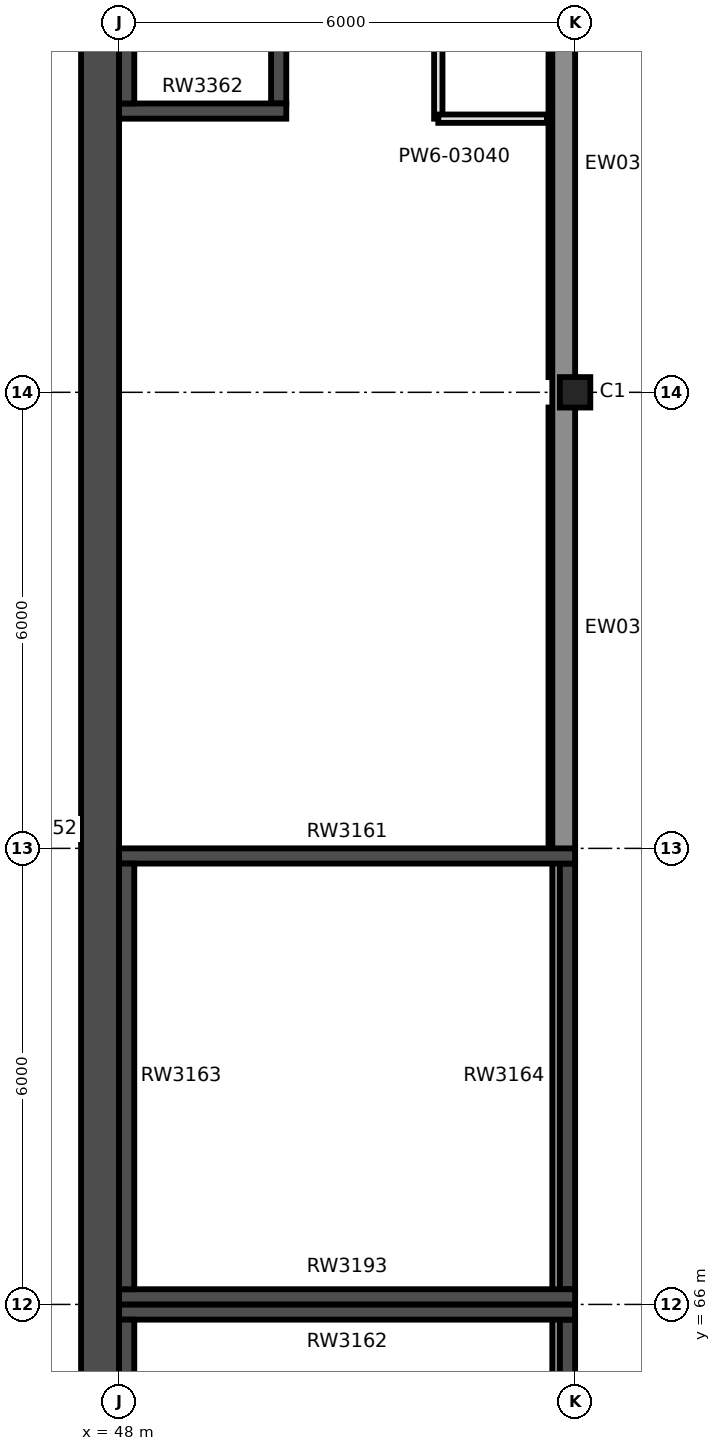
"""IFC4 building model, lengths in metres.
Left out: names, types, materials, properties, quantities, classifications, styles, units other than length and angle.
Written with IfcOpenShell. Run it as: python <this file> out.ifc"""

import sys

from ifc_helpers import new_model, si_unit, direction, frame, frame_2d, origin, origin_2d, place, context, subcontext, project, spatial, rectangle, extrude, element, fill, save


model = new_model("IFC4")
c1 = context("Model", 3, precision=1e-05, world=origin(), true_north=direction((0.0, 1.0)))
c2 = subcontext(c1, "Body", "Model", "MODEL_VIEW")
j1 = project(units=[si_unit("LENGTHUNIT", "METRE"), si_unit("PLANEANGLEUNIT", "RADIAN")], contexts=[c1])
p1 = place(None, origin())
s1 = spatial("IfcSite", under=j1, at=p1, CompositionType="ELEMENT")
p2 = place(p1, origin())
s2 = spatial("IfcBuilding", under=s1, at=p2, CompositionType="ELEMENT")
p3 = place(p2, frame((0.0, 0.0, 16.5)))
s3 = spatial("IfcBuildingStorey", under=s2, at=p3, CompositionType="ELEMENT", Elevation=16.5)
p4 = place(p3, frame((54.0, 78.0, 0.0), z_axis=(0.0, 0.0, 1.0), x_axis=(1.0, 0.0, 0.0)))
e1 = element("IfcColumn", 1, at=p4, inside=s3, PredefinedType="COLUMN", context=c2, shape_type="SweptSolid", body=[
    extrude(rectangle(XDim=0.4, YDim=0.4, at=origin_2d()), origin(), (0.0, 0.0, 1.0), 4.5),
])
p5 = place(p3, frame((48.0, 71.9, 0.0), z_axis=(0.0, 0.0, 1.0), x_axis=(1.0, 0.0, 0.0)))
e2 = element("IfcWall", 2, at=p5, inside=s3, PredefinedType="SHEAR", context=c2, shape_type="SweptSolid", body=[
    extrude(rectangle(XDim=6.0, YDim=0.2, at=frame_2d((3.0, 0.0))), origin(), (0.0, 0.0, 1.0), 4.422),
])
p6 = place(p5, frame((4.6, 0.0, 0.0)))
e3 = element("IfcOpeningElement", 3, at=p6, cuts=e2, PredefinedType="OPENING", context=c2, shape_type="SweptSolid", body=[
    extrude(rectangle(XDim=1.1, YDim=2.2, at=frame_2d((0.55, 1.1))), frame((0.0, 0.11, 0.0), z_axis=(0.0, -1.0, 0.0), x_axis=(1.0, 0.0, 0.0)), (0.0, 0.0, 1.0), 0.22),
])
p7 = place(p3, frame((48.0, 66.1, 0.0), z_axis=(0.0, 0.0, 1.0), x_axis=(1.0, 0.0, 0.0)))
e4 = element("IfcWall", 4, at=p7, inside=s3, PredefinedType="SHEAR", context=c2, shape_type="SweptSolid", body=[
    extrude(rectangle(XDim=6.0, YDim=0.2, at=frame_2d((3.0, 0.0))), origin(), (0.0, 0.0, 1.0), 4.422),
])
p8 = place(p3, frame((48.1, 66.2, 0.0), z_axis=(0.0, 0.0, 1.0), x_axis=(0.0, 1.0, 0.0)))
e5 = element("IfcWall", 5, at=p8, inside=s3, PredefinedType="SHEAR", context=c2, shape_type="SweptSolid", body=[
    extrude(rectangle(XDim=5.6, YDim=0.2, at=frame_2d((2.8, 0.0))), origin(), (0.0, 0.0, 1.0), 4.422),
])
p9 = place(p3, frame((53.9, 66.2, 0.0), z_axis=(0.0, 0.0, 1.0), x_axis=(0.0, 1.0, 0.0)))
e6 = element("IfcWall", 6, at=p9, inside=s3, PredefinedType="SHEAR", context=c2, shape_type="SweptSolid", body=[
    extrude(rectangle(XDim=5.6, YDim=0.2, at=frame_2d((2.8, 0.0))), origin(), (0.0, 0.0, 1.0), 4.5),
])
p10 = place(p3, frame((48.0, 65.9, 0.0), z_axis=(0.0, 0.0, 1.0), x_axis=(1.0, 0.0, 0.0)))
e7 = element("IfcWall", 7, at=p10, inside=s3, PredefinedType="SHEAR", context=c2, shape_type="SweptSolid", body=[
    extrude(rectangle(XDim=6.0, YDim=0.2, at=frame_2d((3.0, 0.0))), origin(), (0.0, 0.0, 1.0), 4.422),
])
p11 = place(p3, frame((48.1, 60.2, 0.0), z_axis=(0.0, 0.0, 1.0), x_axis=(0.0, 1.0, 0.0)))
e8 = element("IfcWall", 8, at=p11, inside=s3, PredefinedType="SHEAR", context=c2, shape_type="SweptSolid", body=[
    extrude(rectangle(XDim=5.6, YDim=0.2, at=frame_2d((2.8, 0.0))), origin(), (0.0, 0.0, 1.0), 4.422),
])
p12 = place(p3, frame((53.9, 60.2, 0.0), z_axis=(0.0, 0.0, 1.0), x_axis=(0.0, 1.0, 0.0)))
e9 = element("IfcWall", 9, at=p12, inside=s3, PredefinedType="SHEAR", context=c2, shape_type="SweptSolid", body=[
    extrude(rectangle(XDim=5.6, YDim=0.2, at=frame_2d((2.8, 0.0))), origin(), (0.0, 0.0, 1.0), 4.5),
])
p13 = place(p12, frame((2.55, 0.0, 0.9)))
e10 = element("IfcOpeningElement", 10, at=p13, cuts=e9, PredefinedType="OPENING", context=c2, shape_type="SweptSolid", body=[
    extrude(rectangle(XDim=0.5, YDim=2.1, at=frame_2d((0.25, 1.05))), frame((0.0, 0.11, 0.0), z_axis=(0.0, -1.0, 0.0), x_axis=(1.0, 0.0, 0.0)), (0.0, 0.0, 1.0), 0.22),
])
p14 = place(p3, frame((48.0, 81.7, 0.0), z_axis=(0.0, 0.0, 1.0), x_axis=(1.0, 0.0, 0.0)))
e11 = element("IfcWall", 11, at=p14, inside=s3, PredefinedType="SHEAR", context=c2, shape_type="SweptSolid", body=[
    extrude(rectangle(XDim=2.2, YDim=0.2, at=frame_2d((1.1, 0.0))), origin(), (0.0, 0.0, 1.0), 4.422),
])
p15 = place(p14, frame((0.55, 0.0, 0.0)))
e12 = element("IfcOpeningElement", 12, at=p15, cuts=e11, PredefinedType="OPENING", context=c2, shape_type="SweptSolid", body=[
    extrude(rectangle(XDim=1.1, YDim=2.1, at=frame_2d((0.55, 1.05))), frame((0.0, 0.11, 0.0), z_axis=(0.0, -1.0, 0.0), x_axis=(1.0, 0.0, 0.0)), (0.0, 0.0, 1.0), 0.22),
])
p16 = place(p3, frame((48.1, 81.8, 0.0), z_axis=(0.0, 0.0, 1.0), x_axis=(0.0, 1.0, 0.0)))
e13 = element("IfcWall", 13, at=p16, inside=s3, PredefinedType="SHEAR", context=c2, shape_type="SweptSolid", body=[
    extrude(rectangle(XDim=2.0, YDim=0.2, at=frame_2d((1.0, 0.0))), origin(), (0.0, 0.0, 1.0), 4.422),
])
p17 = place(p3, frame((50.1, 81.8, 0.0), z_axis=(0.0, 0.0, 1.0), x_axis=(0.0, 1.0, 0.0)))
e14 = element("IfcWall", 14, at=p17, inside=s3, PredefinedType="SHEAR", context=c2, shape_type="SweptSolid", body=[
    extrude(rectangle(XDim=2.0, YDim=0.2, at=frame_2d((1.0, 0.0))), origin(), (0.0, 0.0, 1.0), 4.5),
])
p18 = place(p3, frame((47.75, 54.5, 0.0), z_axis=(0.0, 0.0, 1.0), x_axis=(0.0, 1.0, 0.0)))
e15 = element("IfcWall", 15, at=p18, inside=s3, PredefinedType="SHEAR", context=c2, shape_type="SweptSolid", body=[
    extrude(rectangle(XDim=35.5, YDim=0.5, at=frame_2d((17.75, 0.0))), origin(), (0.0, 0.0, 1.0), 3.9),
])
p19 = place(p18, frame((29.35, 0.0, 0.0)))
e16 = element("IfcOpeningElement", 16, at=p19, cuts=e15, PredefinedType="OPENING", context=c2, shape_type="SweptSolid", body=[
    extrude(rectangle(XDim=1.3, YDim=2.1, at=frame_2d((0.65, 1.05))), frame((0.0, 0.26, 0.0), z_axis=(0.0, -1.0, 0.0), x_axis=(1.0, 0.0, 0.0)), (0.0, 0.0, 1.0), 0.52),
])
p20 = place(p18, frame((2.6, 0.0, 0.0)))
e17 = element("IfcOpeningElement", 17, at=p20, cuts=e15, PredefinedType="OPENING", context=c2, shape_type="SweptSolid", body=[
    extrude(rectangle(XDim=1.0, YDim=2.1, at=frame_2d((0.5, 1.05))), frame((0.0, 0.26, 0.0), z_axis=(0.0, -1.0, 0.0), x_axis=(1.0, 0.0, 0.0)), (0.0, 0.0, 1.0), 0.52),
])
p21 = place(p3, frame((53.825, 83.8, 0.0), z_axis=(0.0, 0.0, 1.0), x_axis=(0.0, -1.0, 0.0)))
e18 = element("IfcWall", 18, at=p21, inside=s3, PredefinedType="SOLIDWALL", context=c2, shape_type="SweptSolid", body=[
    extrude(rectangle(XDim=5.6, YDim=0.35, at=frame_2d((2.8, 0.0))), origin(), (0.0, 0.0, 1.0), 3.9),
])
p22 = place(p21, frame((1.25, 0.0, 2.4)))
e19 = element("IfcOpeningElement", 19, at=p22, cuts=e18, PredefinedType="OPENING", context=c2, shape_type="SweptSolid", body=[
    extrude(rectangle(XDim=0.7, YDim=1.1, at=frame_2d((0.35, 0.55))), frame((0.0, 0.185, 0.0), z_axis=(0.0, -1.0, 0.0), x_axis=(1.0, 0.0, 0.0)), (0.0, 0.0, 1.0), 0.37),
])
p23 = place(p21, frame((3.25, 0.0, 2.4)))
e20 = element("IfcOpeningElement", 20, at=p23, cuts=e18, PredefinedType="OPENING", context=c2, shape_type="SweptSolid", body=[
    extrude(rectangle(XDim=1.1, YDim=1.1, at=frame_2d((0.55, 0.55))), frame((0.0, 0.185, 0.0), z_axis=(0.0, -1.0, 0.0), x_axis=(1.0, 0.0, 0.0)), (0.0, 0.0, 1.0), 0.37),
])
p24 = place(p3, frame((53.825, 77.8, 0.0), z_axis=(0.0, 0.0, 1.0), x_axis=(0.0, -1.0, 0.0)))
e21 = element("IfcWall", 21, at=p24, inside=s3, PredefinedType="SOLIDWALL", context=c2, shape_type="SweptSolid", body=[
    extrude(rectangle(XDim=5.8, YDim=0.35, at=frame_2d((2.9, 0.0))), origin(), (0.0, 0.0, 1.0), 3.9),
])
p25 = place(p24, frame((1.35, 0.0, 2.4)))
e22 = element("IfcOpeningElement", 22, at=p25, cuts=e21, PredefinedType="OPENING", context=c2, shape_type="SweptSolid", body=[
    extrude(rectangle(XDim=1.1, YDim=1.1, at=frame_2d((0.55, 0.55))), frame((0.0, 0.185, 0.0), z_axis=(0.0, -1.0, 0.0), x_axis=(1.0, 0.0, 0.0)), (0.0, 0.0, 1.0), 0.37),
])
p26 = place(p24, frame((3.35, 0.0, 2.4)))
e23 = element("IfcOpeningElement", 23, at=p26, cuts=e21, PredefinedType="OPENING", context=c2, shape_type="SweptSolid", body=[
    extrude(rectangle(XDim=1.1, YDim=1.1, at=frame_2d((0.55, 0.55))), frame((0.0, 0.185, 0.0), z_axis=(0.0, -1.0, 0.0), x_axis=(1.0, 0.0, 0.0)), (0.0, 0.0, 1.0), 0.37),
])
p27 = place(p3, frame((53.85, 30.0, 4.5), z_axis=(0.0, 0.0, 1.0), x_axis=(0.0, 1.0, 0.0)))
e24 = element("IfcWall", 24, at=p27, inside=s3, PredefinedType="PARAPET", context=c2, shape_type="SweptSolid", body=[
    extrude(rectangle(XDim=60.0, YDim=0.3, at=frame_2d((30.0, 0.0))), origin(), (0.0, 0.0, 1.0), 1.2),
])
p28 = place(p3, frame((52.2, 81.6, 0.0), z_axis=(0.0, 0.0, 1.0), x_axis=(0.0, 1.0, 0.0)))
e25 = element("IfcWall", 25, at=p28, inside=s3, PredefinedType="PARTITIONING", context=c2, shape_type="SweptSolid", body=[
    extrude(rectangle(XDim=2.4, YDim=0.11, at=frame_2d((1.2, 0.0))), origin(), (0.0, 0.0, 1.0), 4.28),
])
p29 = place(p28, frame((0.85, 0.0, 0.0)))
e26 = element("IfcOpeningElement", 26, at=p29, cuts=e25, PredefinedType="OPENING", context=c2, shape_type="SweptSolid", body=[
    extrude(rectangle(XDim=0.75, YDim=2.04, at=frame_2d((0.375, 1.02))), frame((0.0, 0.065, 0.0), z_axis=(0.0, -1.0, 0.0), x_axis=(1.0, 0.0, 0.0)), (0.0, 0.0, 1.0), 0.13),
])
p30 = place(p3, frame((52.2, 81.6, 0.0), z_axis=(0.0, 0.0, 1.0), x_axis=(1.0, 0.0, 0.0)))
e27 = element("IfcWall", 27, at=p30, inside=s3, PredefinedType="PARTITIONING", context=c2, shape_type="SweptSolid", body=[
    extrude(rectangle(XDim=1.43, YDim=0.11, at=frame_2d((0.715, 0.0))), origin(), (0.0, 0.0, 1.0), 4.28),
])
p31 = place(p22, origin())
e28 = element("IfcWindow", 28, at=p31, inside=s3, PartitioningType="SINGLE_PANEL", PredefinedType="WINDOW", context=c2, shape_type="SweptSolid", body=[
    extrude(rectangle(XDim=0.7, YDim=1.1, at=frame_2d((0.35, 0.55))), frame((0.0, 0.03, 0.0), z_axis=(0.0, -1.0, 0.0), x_axis=(1.0, 0.0, 0.0)), (0.0, 0.0, 1.0), 0.06),
])
fill(e19, e28)
p32 = place(p23, origin())
e29 = element("IfcWindow", 29, at=p32, inside=s3, PartitioningType="SINGLE_PANEL", PredefinedType="WINDOW", context=c2, shape_type="SweptSolid", body=[
    extrude(rectangle(XDim=1.1, YDim=1.1, at=frame_2d((0.55, 0.55))), frame((0.0, 0.03, 0.0), z_axis=(0.0, -1.0, 0.0), x_axis=(1.0, 0.0, 0.0)), (0.0, 0.0, 1.0), 0.06),
])
fill(e20, e29)
p33 = place(p25, origin())
e30 = element("IfcWindow", 30, at=p33, inside=s3, PartitioningType="SINGLE_PANEL", PredefinedType="WINDOW", context=c2, shape_type="SweptSolid", body=[
    extrude(rectangle(XDim=1.1, YDim=1.1, at=frame_2d((0.55, 0.55))), frame((0.0, 0.03, 0.0), z_axis=(0.0, -1.0, 0.0), x_axis=(1.0, 0.0, 0.0)), (0.0, 0.0, 1.0), 0.06),
])
fill(e22, e30)
p34 = place(p26, origin())
e31 = element("IfcWindow", 31, at=p34, inside=s3, PartitioningType="SINGLE_PANEL", PredefinedType="WINDOW", context=c2, shape_type="SweptSolid", body=[
    extrude(rectangle(XDim=1.1, YDim=1.1, at=frame_2d((0.55, 0.55))), frame((0.0, 0.03, 0.0), z_axis=(0.0, -1.0, 0.0), x_axis=(1.0, 0.0, 0.0)), (0.0, 0.0, 1.0), 0.06),
])
fill(e23, e31)
p35 = place(p6, frame((1.1, 0.0, 0.0), z_axis=(0.0, 0.0, 1.0), x_axis=(-1.0, 0.0, 0.0)))
e32 = element("IfcDoor", 32, at=p35, inside=s3, OperationType="SINGLE_SWING_RIGHT", PredefinedType="DOOR", context=c2, shape_type="SweptSolid", body=[
    extrude(rectangle(XDim=1.1, YDim=2.2, at=frame_2d((0.55, 1.1))), frame((0.0, 0.025, 0.0), z_axis=(0.0, -1.0, 0.0), x_axis=(1.0, 0.0, 0.0)), (0.0, 0.0, 1.0), 0.05),
])
fill(e3, e32)
p36 = place(p29, frame((0.75, 0.0, 0.0), z_axis=(0.0, 0.0, 1.0), x_axis=(-1.0, 0.0, 0.0)))
e33 = element("IfcDoor", 33, at=p36, inside=s3, OperationType="SINGLE_SWING_RIGHT", PredefinedType="DOOR", context=c2, shape_type="SweptSolid", body=[
    extrude(rectangle(XDim=0.75, YDim=2.04, at=frame_2d((0.375, 1.02))), frame((0.0, 0.025, 0.0), z_axis=(0.0, -1.0, 0.0), x_axis=(1.0, 0.0, 0.0)), (0.0, 0.0, 1.0), 0.05),
])
fill(e26, e33)
p37 = place(p15, origin())
e34 = element("IfcDoor", 34, at=p37, inside=s3, OperationType="DOUBLE_DOOR_SLIDING", PredefinedType="DOOR", context=c2, shape_type="SweptSolid", body=[
    extrude(rectangle(XDim=1.1, YDim=2.1, at=frame_2d((0.55, 1.05))), frame((0.0, 0.025, 0.0), z_axis=(0.0, -1.0, 0.0), x_axis=(1.0, 0.0, 0.0)), (0.0, 0.0, 1.0), 0.05),
])
fill(e12, e34)
save(model, sys.argv[1])
